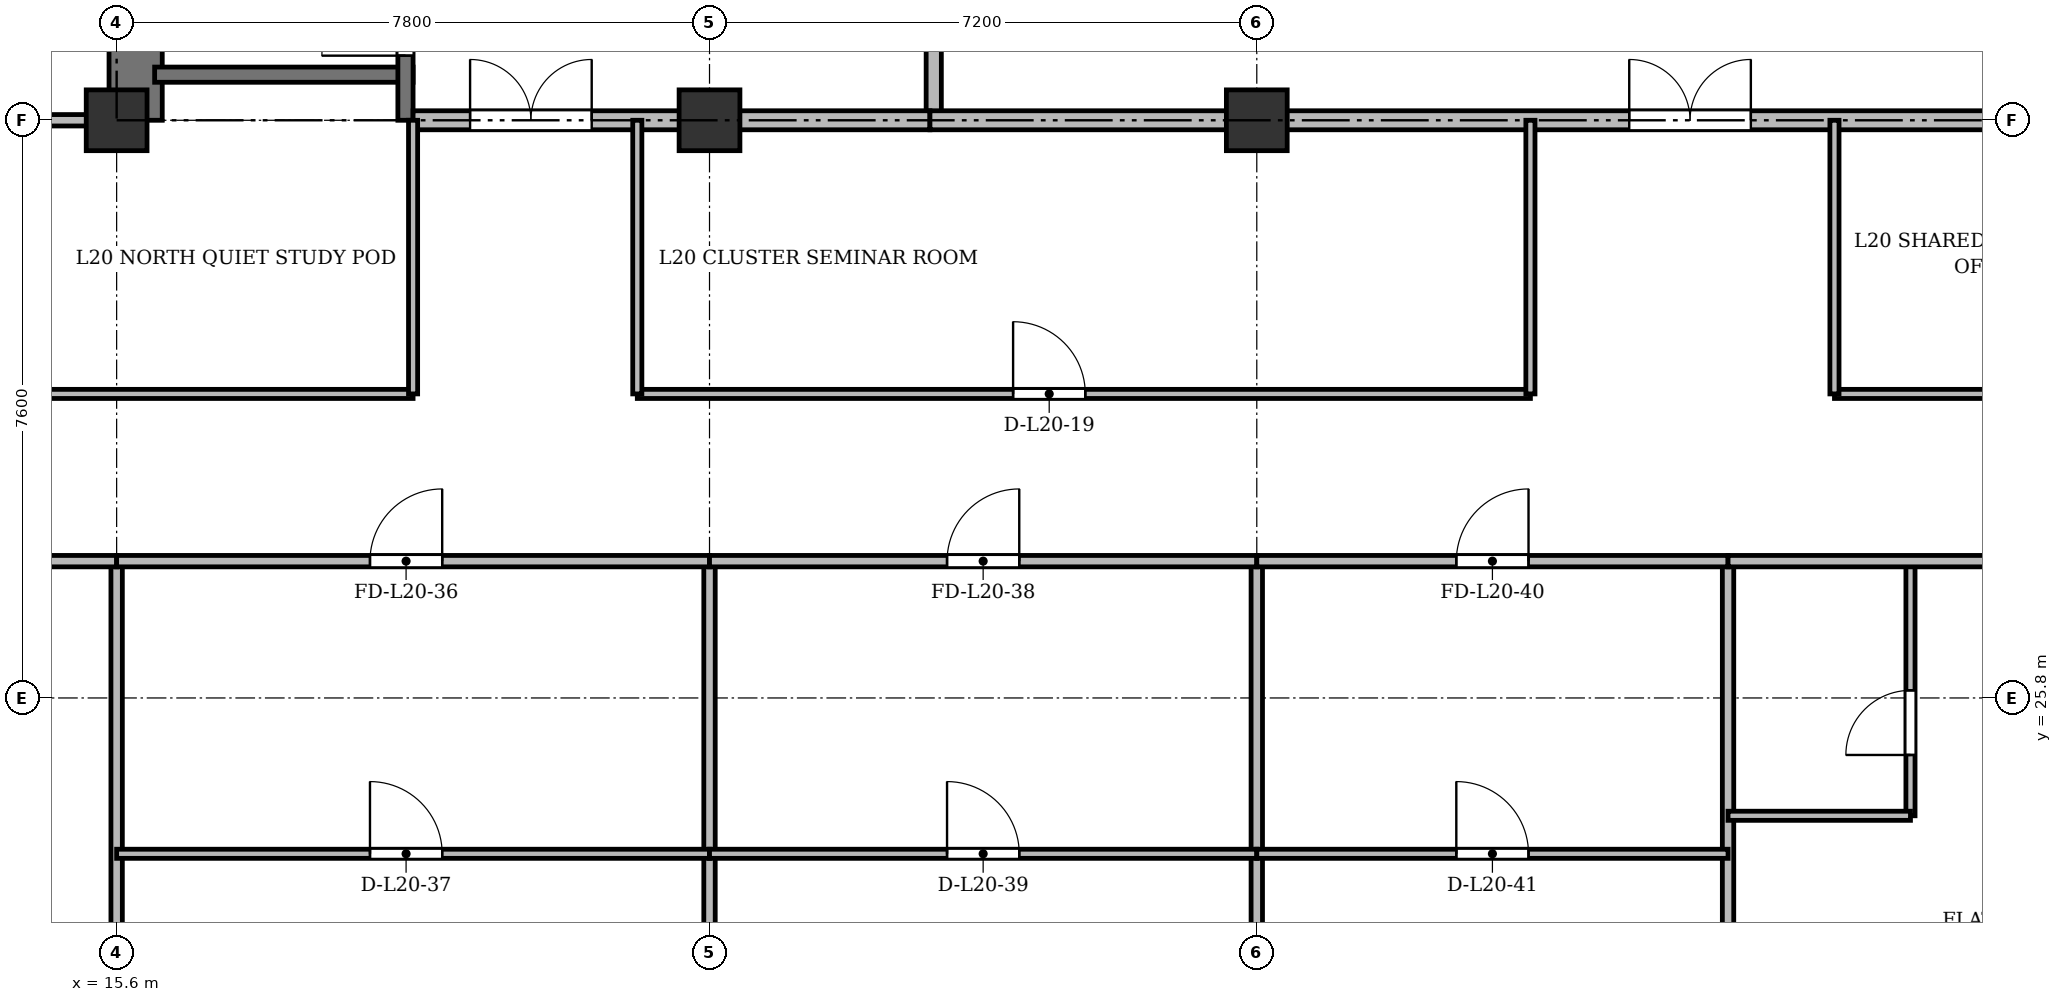
"""IFC4 building model, lengths in metres.
Left out: names, types, materials, properties, quantities, classifications, styles, units other than length and angle.
Written with IfcOpenShell. Run it as: python <this file> out.ifc"""

import sys

from ifc_helpers import new_model, si_unit, direction, frame, frame_2d, origin, origin_2d, place, context, subcontext, project, spatial, rectangle, extrude, source, transform, mapped, element, fill, save


model = new_model("IFC4")
c1 = context("Model", 3, precision=1e-05, world=origin(), true_north=direction((0.0, 1.0)))
c2 = subcontext(c1, "Body", "Model", "MODEL_VIEW")
j1 = project(units=[si_unit("LENGTHUNIT", "METRE"), si_unit("PLANEANGLEUNIT", "RADIAN")], contexts=[c1])
p1 = place(None, origin())
s1 = spatial("IfcSite", under=j1, at=p1, CompositionType="ELEMENT")
p2 = place(p1, origin())
s2 = spatial("IfcBuilding", under=s1, at=p2, CompositionType="ELEMENT")
p3 = place(p2, frame((0.0, 0.0, 81.7)))
s3 = spatial("IfcBuildingStorey", under=s2, at=p3, CompositionType="ELEMENT", Elevation=81.7)
m1 = source(origin(), c2, "Body", "SweptSolid", [
    extrude(rectangle(XDim=0.8, YDim=0.8, at=origin_2d()), origin(), (0.0, 0.0, 1.0), 3.6),
])
for number, where, z_axis, x_axis in (
    (1, (15.6, 33.4, 0.0), (0.0, 0.0, 1.0), (1.0, 0.0, 0.0)),
    (2, (23.4, 33.4, 0.0), (0.0, 0.0, 1.0), (1.0, 0.0, 0.0)),
    (3, (30.6, 33.4, 0.0), (0.0, 0.0, 1.0), (1.0, 0.0, 0.0)),
):
    element("IfcColumn", number, at=place(p3, frame(where, z_axis=z_axis, x_axis=x_axis)), inside=s3, PredefinedType="COLUMN", context=c2, shape_type="MappedRepresentation", body=[
        mapped(m1, transform((0.0, 0.0, 0.0), x_axis=(1.0, 0.0, 0.0), y_axis=(0.0, 1.0, 0.0), z_axis=(0.0, 0.0, 1.0), scale=1.0)),
    ])
p4 = place(p3, frame((15.85, 33.4, 0.0), z_axis=(0.0, 0.0, 1.0), x_axis=(0.0, 1.0, 0.0)))
e4 = element("IfcWall", 4, at=p4, inside=s3, PredefinedType="SHEAR", context=c2, shape_type="SweptSolid", body=[
    extrude(rectangle(XDim=11.7, YDim=0.7, at=frame_2d((5.85, 0.0))), origin(), (0.0, 0.0, 1.0), 3.34),
])
p5 = place(p3, frame((16.1, 34.0, 0.0), z_axis=(0.0, 0.0, 1.0), x_axis=(1.0, 0.0, 0.0)))
e5 = element("IfcWall", 5, at=p5, inside=s3, PredefinedType="SHEAR", context=c2, shape_type="SweptSolid", body=[
    extrude(rectangle(XDim=3.4, YDim=0.2, at=frame_2d((1.7, 0.0))), origin(), (0.0, 0.0, 1.0), 3.34),
])
p6 = place(p3, frame((19.4, 33.4, 0.0), z_axis=(0.0, 0.0, 1.0), x_axis=(0.0, 1.0, 0.0)))
e6 = element("IfcWall", 6, at=p6, inside=s3, PredefinedType="SHEAR", context=c2, shape_type="SweptSolid", body=[
    extrude(rectangle(XDim=11.1, YDim=0.2, at=frame_2d((5.55, 0.0))), origin(), (0.0, 0.0, 1.0), 3.34),
])
p7 = place(p6, frame((0.85, 0.0, 0.0)))
e7 = element("IfcOpeningElement", 7, at=p7, cuts=e6, PredefinedType="OPENING", context=c2, shape_type="SweptSolid", body=[
    extrude(rectangle(XDim=1.1, YDim=2.15, at=frame_2d((0.55, 1.075))), frame((0.0, 0.11, 0.0), z_axis=(0.0, -1.0, 0.0), x_axis=(1.0, 0.0, 0.0)), (0.0, 0.0, 1.0), 0.22),
])
p8 = place(p3, frame((26.35, 33.4, 0.0), z_axis=(0.0, 0.0, 1.0), x_axis=(0.0, 1.0, 0.0)))
e8 = element("IfcWall", 8, at=p8, inside=s3, PredefinedType="SOLIDWALL", context=c2, shape_type="SweptSolid", body=[
    extrude(rectangle(XDim=11.3, YDim=0.2, at=frame_2d((5.65, 0.0))), origin(), (0.0, 0.0, 1.0), 2.752),
])
p9 = place(p3, frame((19.5, 33.4, 0.0), z_axis=(0.0, 0.0, 1.0), x_axis=(1.0, 0.0, 0.0)))
e9 = element("IfcWall", 9, at=p9, inside=s3, PredefinedType="PARTITIONING", context=c2, shape_type="SweptSolid", body=[
    extrude(rectangle(XDim=6.8, YDim=0.25, at=frame_2d((3.4, 0.0))), origin(), (0.0, 0.0, 1.0), 2.752),
])
p10 = place(p9, frame((0.75, 0.0, 0.0)))
e10 = element("IfcOpeningElement", 10, at=p10, cuts=e9, PredefinedType="OPENING", context=c2, shape_type="SweptSolid", body=[
    extrude(rectangle(XDim=1.6, YDim=2.2, at=frame_2d((0.8, 1.1))), frame((0.0, 0.135, 0.0), z_axis=(0.0, -1.0, 0.0), x_axis=(1.0, 0.0, 0.0)), (0.0, 0.0, 1.0), 0.27),
])
p11 = place(p3, frame((26.3, 33.4, 0.0), z_axis=(0.0, 0.0, 1.0), x_axis=(1.0, 0.0, 0.0)))
e11 = element("IfcWall", 11, at=p11, inside=s3, PredefinedType="PARTITIONING", context=c2, shape_type="SweptSolid", body=[
    extrude(rectangle(XDim=20.85, YDim=0.25, at=frame_2d((10.425, 0.0))), origin(), (0.0, 0.0, 1.0), 2.752),
])
p12 = place(p11, frame((9.2, 0.0, 0.0)))
e12 = element("IfcOpeningElement", 12, at=p12, cuts=e11, PredefinedType="OPENING", context=c2, shape_type="SweptSolid", body=[
    extrude(rectangle(XDim=1.6, YDim=2.2, at=frame_2d((0.8, 1.1))), frame((0.0, 0.135, 0.0), z_axis=(0.0, -1.0, 0.0), x_axis=(1.0, 0.0, 0.0)), (0.0, 0.0, 1.0), 0.27),
])
p13 = place(p3, frame((4.75, 29.8, 0.0), z_axis=(0.0, 0.0, 1.0), x_axis=(1.0, 0.0, 0.0)))
e13 = element("IfcWall", 13, at=p13, inside=s3, PredefinedType="PARTITIONING", context=c2, shape_type="SweptSolid", body=[
    extrude(rectangle(XDim=14.75, YDim=0.12, at=frame_2d((7.375, 0.0))), origin(), (0.0, 0.0, 1.0), 2.84),
])
p14 = place(p13, frame((6.9, 0.0, 0.0)))
e14 = element("IfcOpeningElement", 14, at=p14, cuts=e13, PredefinedType="OPENING", context=c2, shape_type="SweptSolid", body=[
    extrude(rectangle(XDim=0.95, YDim=2.15, at=frame_2d((0.475, 1.075))), frame((0.0, 0.07, 0.0), z_axis=(0.0, -1.0, 0.0), x_axis=(1.0, 0.0, 0.0)), (0.0, 0.0, 1.0), 0.14),
])
p15 = place(p3, frame((22.45, 29.8, 0.0), z_axis=(0.0, 0.0, 1.0), x_axis=(1.0, 0.0, 0.0)))
e15 = element("IfcWall", 15, at=p15, inside=s3, PredefinedType="PARTITIONING", context=c2, shape_type="SweptSolid", body=[
    extrude(rectangle(XDim=11.75, YDim=0.12, at=frame_2d((5.875, 0.0))), origin(), (0.0, 0.0, 1.0), 2.84),
])
p16 = place(p15, frame((4.944, 0.0, 0.0)))
e16 = element("IfcOpeningElement", 16, at=p16, cuts=e15, PredefinedType="OPENING", context=c2, shape_type="SweptSolid", body=[
    extrude(rectangle(XDim=0.95, YDim=2.15, at=frame_2d((0.475, 1.075))), frame((0.0, 0.07, 0.0), z_axis=(0.0, -1.0, 0.0), x_axis=(1.0, 0.0, 0.0)), (0.0, 0.0, 1.0), 0.14),
])
p17 = place(p3, frame((38.2, 29.8, 0.0), z_axis=(0.0, 0.0, 1.0), x_axis=(1.0, 0.0, 0.0)))
e17 = element("IfcWall", 17, at=p17, inside=s3, PredefinedType="PARTITIONING", context=c2, shape_type="SweptSolid", body=[
    extrude(rectangle(XDim=8.6, YDim=0.12, at=frame_2d((4.3, 0.0))), origin(), (0.0, 0.0, 1.0), 2.84),
])
p18 = place(p17, frame((3.462, 0.0, 0.0)))
e18 = element("IfcOpeningElement", 18, at=p18, cuts=e17, PredefinedType="OPENING", context=c2, shape_type="SweptSolid", body=[
    extrude(rectangle(XDim=0.95, YDim=2.15, at=frame_2d((0.475, 1.075))), frame((0.0, 0.07, 0.0), z_axis=(0.0, -1.0, 0.0), x_axis=(1.0, 0.0, 0.0)), (0.0, 0.0, 1.0), 0.14),
])
for number, where, z_axis, x_axis in (
    (19, (19.5, 29.8, 0.0), (0.0, 0.0, 1.0), (0.0, 1.0, 0.0)),
    (20, (22.45, 29.8, 0.0), (0.0, 0.0, 1.0), (0.0, 1.0, 0.0)),
    (21, (34.2, 29.8, 0.0), (0.0, 0.0, 1.0), (0.0, 1.0, 0.0)),
    (22, (38.2, 29.8, 0.0), (0.0, 0.0, 1.0), (0.0, 1.0, 0.0)),
):
    element("IfcWall", number, at=place(p3, frame(where, z_axis=z_axis, x_axis=x_axis)), inside=s3, PredefinedType="PARTITIONING", context=c2, shape_type="SweptSolid", body=[
        extrude(rectangle(XDim=3.6, YDim=0.12, at=frame_2d((1.8, 0.0))), origin(), (0.0, 0.0, 1.0), 2.752),
    ])
p19 = place(p3, frame((4.75, 33.4, 0.0), z_axis=(0.0, 0.0, 1.0), x_axis=(1.0, 0.0, 0.0)))
e23 = element("IfcWall", 23, at=p19, inside=s3, PredefinedType="PARTITIONING", context=c2, shape_type="SweptSolid", body=[
    extrude(rectangle(XDim=10.85, YDim=0.15, at=frame_2d((5.425, 0.0))), origin(), (0.0, 0.0, 1.0), 2.752),
])
p20 = place(p19, frame((4.94, 0.0, 0.0)))
e24 = element("IfcOpeningElement", 24, at=p20, cuts=e23, PredefinedType="OPENING", context=c2, shape_type="SweptSolid", body=[
    extrude(rectangle(XDim=0.95, YDim=2.15, at=frame_2d((0.475, 1.075))), frame((0.0, 0.085, 0.0), z_axis=(0.0, -1.0, 0.0), x_axis=(1.0, 0.0, 0.0)), (0.0, 0.0, 1.0), 0.17),
])
for number, where, z_axis, x_axis in (
    (25, (15.6, 3.145, 0.0), (0.0, 0.0, 1.0), (0.0, 1.0, 0.0)),
    (26, (23.4, 3.145, 0.0), (0.0, 0.0, 1.0), (0.0, 1.0, 0.0)),
    (27, (30.6, 3.145, 0.0), (0.0, 0.0, 1.0), (0.0, 1.0, 0.0)),
):
    element("IfcWall", number, at=place(p3, frame(where, z_axis=z_axis, x_axis=x_axis)), inside=s3, PredefinedType="PARTITIONING", context=c2, shape_type="SweptSolid", body=[
        extrude(rectangle(XDim=24.455, YDim=0.15, at=frame_2d((12.228, 0.0))), origin(), (0.0, 0.0, 1.0), 2.84),
    ])
p21 = place(p3, frame((36.8, 3.145, 0.0), z_axis=(0.0, 0.0, 1.0), x_axis=(0.0, 1.0, 0.0)))
e28 = element("IfcWall", 28, at=p21, inside=s3, PredefinedType="PARTITIONING", context=c2, shape_type="SweptSolid", body=[
    extrude(rectangle(XDim=24.455, YDim=0.15, at=frame_2d((12.228, 0.0))), origin(), (0.0, 0.0, 1.0), 2.752),
])
p22 = place(p3, frame((10.6, 27.6, 0.0), z_axis=(0.0, 0.0, 1.0), x_axis=(1.0, 0.0, 0.0)))
e29 = element("IfcWall", 29, at=p22, inside=s3, PredefinedType="PARTITIONING", context=c2, shape_type="SweptSolid", body=[
    extrude(rectangle(XDim=5.0, YDim=0.15, at=frame_2d((2.5, 0.0))), origin(), (0.0, 0.0, 1.0), 2.84),
])
p23 = place(p22, frame((2.025, 0.0, 0.0)))
e30 = element("IfcOpeningElement", 30, at=p23, cuts=e29, PredefinedType="OPENING", context=c2, shape_type="SweptSolid", body=[
    extrude(rectangle(XDim=0.95, YDim=2.15, at=frame_2d((0.475, 1.075))), frame((0.0, 0.085, 0.0), z_axis=(0.0, -1.0, 0.0), x_axis=(1.0, 0.0, 0.0)), (0.0, 0.0, 1.0), 0.17),
])
p24 = place(p3, frame((15.6, 27.6, 0.0), z_axis=(0.0, 0.0, 1.0), x_axis=(1.0, 0.0, 0.0)))
e31 = element("IfcWall", 31, at=p24, inside=s3, PredefinedType="PARTITIONING", context=c2, shape_type="SweptSolid", body=[
    extrude(rectangle(XDim=7.8, YDim=0.15, at=frame_2d((3.9, 0.0))), origin(), (0.0, 0.0, 1.0), 2.84),
])
p25 = place(p24, frame((3.333, 0.0, 0.0)))
e32 = element("IfcOpeningElement", 32, at=p25, cuts=e31, PredefinedType="OPENING", context=c2, shape_type="SweptSolid", body=[
    extrude(rectangle(XDim=0.95, YDim=2.15, at=frame_2d((0.475, 1.075))), frame((0.0, 0.085, 0.0), z_axis=(0.0, -1.0, 0.0), x_axis=(1.0, 0.0, 0.0)), (0.0, 0.0, 1.0), 0.17),
])
p26 = place(p3, frame((15.6, 23.75, 0.0), z_axis=(0.0, 0.0, 1.0), x_axis=(1.0, 0.0, 0.0)))
e33 = element("IfcWall", 33, at=p26, inside=s3, PredefinedType="PARTITIONING", context=c2, shape_type="SweptSolid", body=[
    extrude(rectangle(XDim=7.8, YDim=0.12, at=frame_2d((3.9, 0.0))), origin(), (0.0, 0.0, 1.0), 2.84),
])
p27 = place(p26, frame((3.333, 0.0, 0.0)))
e34 = element("IfcOpeningElement", 34, at=p27, cuts=e33, PredefinedType="OPENING", context=c2, shape_type="SweptSolid", body=[
    extrude(rectangle(XDim=0.95, YDim=2.15, at=frame_2d((0.475, 1.075))), frame((0.0, 0.07, 0.0), z_axis=(0.0, -1.0, 0.0), x_axis=(1.0, 0.0, 0.0)), (0.0, 0.0, 1.0), 0.14),
])
p28 = place(p3, frame((23.4, 27.6, 0.0), z_axis=(0.0, 0.0, 1.0), x_axis=(1.0, 0.0, 0.0)))
e35 = element("IfcWall", 35, at=p28, inside=s3, PredefinedType="PARTITIONING", context=c2, shape_type="SweptSolid", body=[
    extrude(rectangle(XDim=7.2, YDim=0.15, at=frame_2d((3.6, 0.0))), origin(), (0.0, 0.0, 1.0), 2.84),
])
p29 = place(p28, frame((3.125, 0.0, 0.0)))
e36 = element("IfcOpeningElement", 36, at=p29, cuts=e35, PredefinedType="OPENING", context=c2, shape_type="SweptSolid", body=[
    extrude(rectangle(XDim=0.95, YDim=2.15, at=frame_2d((0.475, 1.075))), frame((0.0, 0.085, 0.0), z_axis=(0.0, -1.0, 0.0), x_axis=(1.0, 0.0, 0.0)), (0.0, 0.0, 1.0), 0.17),
])
p30 = place(p3, frame((23.4, 23.75, 0.0), z_axis=(0.0, 0.0, 1.0), x_axis=(1.0, 0.0, 0.0)))
e37 = element("IfcWall", 37, at=p30, inside=s3, PredefinedType="PARTITIONING", context=c2, shape_type="SweptSolid", body=[
    extrude(rectangle(XDim=7.2, YDim=0.12, at=frame_2d((3.6, 0.0))), origin(), (0.0, 0.0, 1.0), 2.84),
])
p31 = place(p30, frame((3.125, 0.0, 0.0)))
e38 = element("IfcOpeningElement", 38, at=p31, cuts=e37, PredefinedType="OPENING", context=c2, shape_type="SweptSolid", body=[
    extrude(rectangle(XDim=0.95, YDim=2.15, at=frame_2d((0.475, 1.075))), frame((0.0, 0.07, 0.0), z_axis=(0.0, -1.0, 0.0), x_axis=(1.0, 0.0, 0.0)), (0.0, 0.0, 1.0), 0.14),
])
p32 = place(p3, frame((30.6, 27.6, 0.0), z_axis=(0.0, 0.0, 1.0), x_axis=(1.0, 0.0, 0.0)))
e39 = element("IfcWall", 39, at=p32, inside=s3, PredefinedType="PARTITIONING", context=c2, shape_type="SweptSolid", body=[
    extrude(rectangle(XDim=6.2, YDim=0.15, at=frame_2d((3.1, 0.0))), origin(), (0.0, 0.0, 1.0), 2.84),
])
p33 = place(p32, frame((2.625, 0.0, 0.0)))
e40 = element("IfcOpeningElement", 40, at=p33, cuts=e39, PredefinedType="OPENING", context=c2, shape_type="SweptSolid", body=[
    extrude(rectangle(XDim=0.95, YDim=2.15, at=frame_2d((0.475, 1.075))), frame((0.0, 0.085, 0.0), z_axis=(0.0, -1.0, 0.0), x_axis=(1.0, 0.0, 0.0)), (0.0, 0.0, 1.0), 0.17),
])
p34 = place(p3, frame((30.6, 23.75, 0.0), z_axis=(0.0, 0.0, 1.0), x_axis=(1.0, 0.0, 0.0)))
e41 = element("IfcWall", 41, at=p34, inside=s3, PredefinedType="PARTITIONING", context=c2, shape_type="SweptSolid", body=[
    extrude(rectangle(XDim=6.2, YDim=0.12, at=frame_2d((3.1, 0.0))), origin(), (0.0, 0.0, 1.0), 2.84),
])
p35 = place(p34, frame((2.625, 0.0, 0.0)))
e42 = element("IfcOpeningElement", 42, at=p35, cuts=e41, PredefinedType="OPENING", context=c2, shape_type="SweptSolid", body=[
    extrude(rectangle(XDim=0.95, YDim=2.15, at=frame_2d((0.475, 1.075))), frame((0.0, 0.07, 0.0), z_axis=(0.0, -1.0, 0.0), x_axis=(1.0, 0.0, 0.0)), (0.0, 0.0, 1.0), 0.14),
])
p36 = place(p3, frame((39.2, 24.25, 0.0), z_axis=(0.0, 0.0, 1.0), x_axis=(0.0, 1.0, 0.0)))
e43 = element("IfcWall", 43, at=p36, inside=s3, PredefinedType="PARTITIONING", context=c2, shape_type="SweptSolid", body=[
    extrude(rectangle(XDim=3.35, YDim=0.12, at=frame_2d((1.675, 0.0))), origin(), (0.0, 0.0, 1.0), 2.99),
])
p37 = place(p36, frame((0.8, 0.0, 0.0)))
e44 = element("IfcOpeningElement", 44, at=p37, cuts=e43, PredefinedType="OPENING", context=c2, shape_type="SweptSolid", body=[
    extrude(rectangle(XDim=0.85, YDim=2.1, at=frame_2d((0.425, 1.05))), frame((0.0, 0.07, 0.0), z_axis=(0.0, -1.0, 0.0), x_axis=(1.0, 0.0, 0.0)), (0.0, 0.0, 1.0), 0.14),
])
p38 = place(p3, frame((36.8, 24.25, 0.0), z_axis=(0.0, 0.0, 1.0), x_axis=(1.0, 0.0, 0.0)))
e45 = element("IfcWall", 45, at=p38, inside=s3, PredefinedType="PARTITIONING", context=c2, shape_type="SweptSolid", body=[
    extrude(rectangle(XDim=2.4, YDim=0.12, at=frame_2d((1.2, 0.0))), origin(), (0.0, 0.0, 1.0), 3.34),
])
p39 = place(p3, frame((36.8, 27.6, 0.0), z_axis=(0.0, 0.0, 1.0), x_axis=(1.0, 0.0, 0.0)))
e46 = element("IfcWall", 46, at=p39, inside=s3, PredefinedType="PARTITIONING", context=c2, shape_type="SweptSolid", body=[
    extrude(rectangle(XDim=7.0, YDim=0.15, at=frame_2d((3.5, 0.0))), origin(), (0.0, 0.0, 1.0), 2.84),
])
p40 = place(p39, frame((4.7, 0.0, 0.0)))
e47 = element("IfcOpeningElement", 47, at=p40, cuts=e46, PredefinedType="OPENING", context=c2, shape_type="SweptSolid", body=[
    extrude(rectangle(XDim=0.95, YDim=2.15, at=frame_2d((0.475, 1.075))), frame((0.0, 0.085, 0.0), z_axis=(0.0, -1.0, 0.0), x_axis=(1.0, 0.0, 0.0)), (0.0, 0.0, 1.0), 0.17),
])
m2 = source(origin(), c2, "Body", "SweptSolid", [
    extrude(rectangle(XDim=1.1, YDim=2.15, at=frame_2d((0.55, 1.075))), frame((0.0, 0.025, 0.0), z_axis=(0.0, -1.0, 0.0), x_axis=(1.0, 0.0, 0.0)), (0.0, 0.0, 1.0), 0.05),
])
p41 = place(p7, origin())
e48 = element("IfcDoor", 48, at=p41, inside=s3, OperationType="SINGLE_SWING_LEFT", PredefinedType="DOOR", context=c2, shape_type="MappedRepresentation", body=[
    mapped(m2, transform((0.0, 0.0, 0.0), x_axis=(1.0, 0.0, 0.0), y_axis=(0.0, 1.0, 0.0), z_axis=(0.0, 0.0, 1.0), scale=1.0)),
])
fill(e7, e48)
m3 = source(origin(), c2, "Body", "SweptSolid", [
    extrude(rectangle(XDim=1.6, YDim=2.2, at=frame_2d((0.8, 1.1))), frame((0.0, 0.025, 0.0), z_axis=(0.0, -1.0, 0.0), x_axis=(1.0, 0.0, 0.0)), (0.0, 0.0, 1.0), 0.05),
])
p42 = place(p10, origin())
e49 = element("IfcDoor", 49, at=p42, inside=s3, OperationType="DOUBLE_DOOR_SINGLE_SWING", PredefinedType="DOOR", context=c2, shape_type="MappedRepresentation", body=[
    mapped(m3, transform((0.0, 0.0, 0.0), x_axis=(1.0, 0.0, 0.0), y_axis=(0.0, 1.0, 0.0), z_axis=(0.0, 0.0, 1.0), scale=1.0)),
])
fill(e10, e49)
p43 = place(p12, origin())
e50 = element("IfcDoor", 50, at=p43, inside=s3, OperationType="DOUBLE_DOOR_SINGLE_SWING", PredefinedType="DOOR", context=c2, shape_type="MappedRepresentation", body=[
    mapped(m3, transform((0.0, 0.0, 0.0), x_axis=(1.0, 0.0, 0.0), y_axis=(0.0, 1.0, 0.0), z_axis=(0.0, 0.0, 1.0), scale=1.0)),
])
fill(e12, e50)
m4 = source(origin(), c2, "Body", "SweptSolid", [
    extrude(rectangle(XDim=0.95, YDim=2.15, at=frame_2d((0.475, 1.075))), frame((0.0, 0.025, 0.0), z_axis=(0.0, -1.0, 0.0), x_axis=(1.0, 0.0, 0.0)), (0.0, 0.0, 1.0), 0.05),
])
p44 = place(p16, origin())
e51 = element("IfcDoor", 51, at=p44, inside=s3, OperationType="SINGLE_SWING_LEFT", PredefinedType="DOOR", context=c2, shape_type="MappedRepresentation", body=[
    mapped(m4, transform((0.0, 0.0, 0.0), x_axis=(1.0, 0.0, 0.0), y_axis=(0.0, 1.0, 0.0), z_axis=(0.0, 0.0, 1.0), scale=1.0)),
])
fill(e16, e51)
p45 = place(p25, origin())
e52 = element("IfcDoor", 52, at=p45, inside=s3, OperationType="SINGLE_SWING_RIGHT", PredefinedType="DOOR", context=c2, shape_type="MappedRepresentation", body=[
    mapped(m4, transform((0.0, 0.0, 0.0), x_axis=(1.0, 0.0, 0.0), y_axis=(0.0, 1.0, 0.0), z_axis=(0.0, 0.0, 1.0), scale=1.0)),
])
fill(e32, e52)
p46 = place(p27, origin())
e53 = element("IfcDoor", 53, at=p46, inside=s3, OperationType="SINGLE_SWING_LEFT", PredefinedType="DOOR", context=c2, shape_type="MappedRepresentation", body=[
    mapped(m4, transform((0.0, 0.0, 0.0), x_axis=(1.0, 0.0, 0.0), y_axis=(0.0, 1.0, 0.0), z_axis=(0.0, 0.0, 1.0), scale=1.0)),
])
fill(e34, e53)
p47 = place(p29, origin())
e54 = element("IfcDoor", 54, at=p47, inside=s3, OperationType="SINGLE_SWING_RIGHT", PredefinedType="DOOR", context=c2, shape_type="MappedRepresentation", body=[
    mapped(m4, transform((0.0, 0.0, 0.0), x_axis=(1.0, 0.0, 0.0), y_axis=(0.0, 1.0, 0.0), z_axis=(0.0, 0.0, 1.0), scale=1.0)),
])
fill(e36, e54)
p48 = place(p31, origin())
e55 = element("IfcDoor", 55, at=p48, inside=s3, OperationType="SINGLE_SWING_LEFT", PredefinedType="DOOR", context=c2, shape_type="MappedRepresentation", body=[
    mapped(m4, transform((0.0, 0.0, 0.0), x_axis=(1.0, 0.0, 0.0), y_axis=(0.0, 1.0, 0.0), z_axis=(0.0, 0.0, 1.0), scale=1.0)),
])
fill(e38, e55)
p49 = place(p33, origin())
e56 = element("IfcDoor", 56, at=p49, inside=s3, OperationType="SINGLE_SWING_RIGHT", PredefinedType="DOOR", context=c2, shape_type="MappedRepresentation", body=[
    mapped(m4, transform((0.0, 0.0, 0.0), x_axis=(1.0, 0.0, 0.0), y_axis=(0.0, 1.0, 0.0), z_axis=(0.0, 0.0, 1.0), scale=1.0)),
])
fill(e40, e56)
p50 = place(p35, origin())
e57 = element("IfcDoor", 57, at=p50, inside=s3, OperationType="SINGLE_SWING_LEFT", PredefinedType="DOOR", context=c2, shape_type="MappedRepresentation", body=[
    mapped(m4, transform((0.0, 0.0, 0.0), x_axis=(1.0, 0.0, 0.0), y_axis=(0.0, 1.0, 0.0), z_axis=(0.0, 0.0, 1.0), scale=1.0)),
])
fill(e42, e57)
m5 = source(origin(), c2, "Body", "SweptSolid", [
    extrude(rectangle(XDim=0.85, YDim=2.1, at=frame_2d((0.425, 1.05))), frame((0.0, 0.025, 0.0), z_axis=(0.0, -1.0, 0.0), x_axis=(1.0, 0.0, 0.0)), (0.0, 0.0, 1.0), 0.05),
])
p51 = place(p37, origin())
e58 = element("IfcDoor", 58, at=p51, inside=s3, OperationType="SINGLE_SWING_LEFT", PredefinedType="DOOR", context=c2, shape_type="MappedRepresentation", body=[
    mapped(m5, transform((0.0, 0.0, 0.0), x_axis=(1.0, 0.0, 0.0), y_axis=(0.0, 1.0, 0.0), z_axis=(0.0, 0.0, 1.0), scale=1.0)),
])
fill(e44, e58)
save(model, sys.argv[1])
